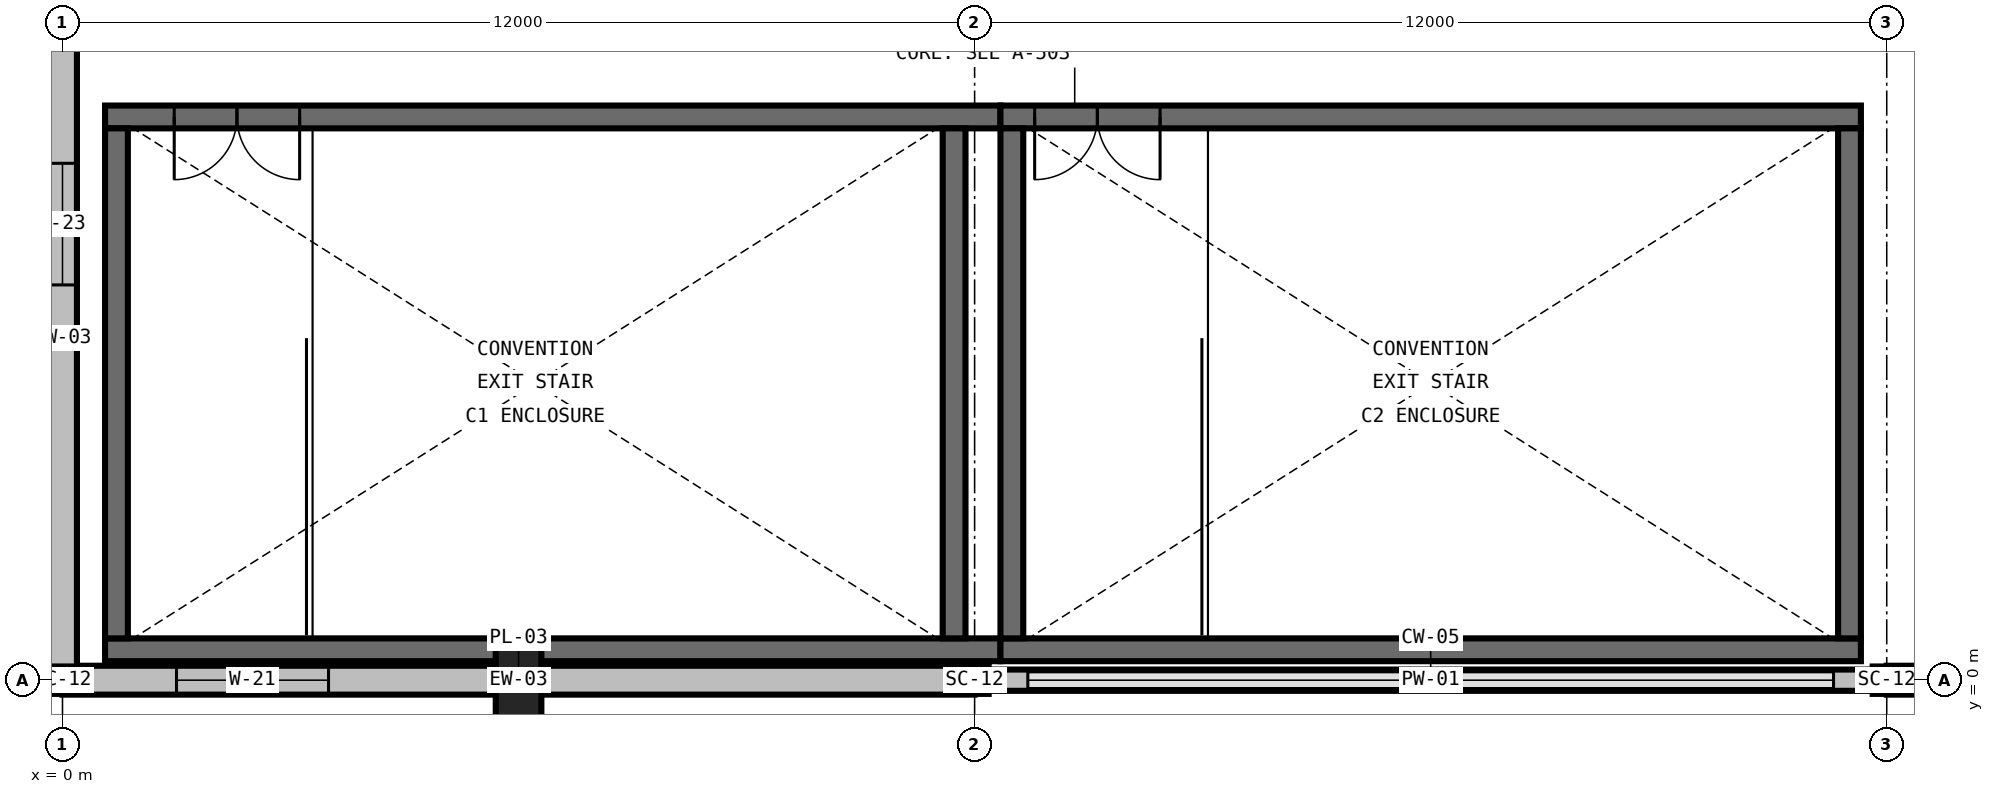
"""IFC4 building model, lengths in metres.
Left out: names, types, materials, properties, quantities, classifications, styles, units other than length and angle.
Written with IfcOpenShell. Run it as: python <this file> out.ifc"""

import sys

from ifc_helpers import new_model, si_unit, direction, frame, frame_2d, origin, origin_with_axes, origin_2d, place, context, subcontext, project, spatial, rectangle, i_section, extrude, element, fill, save


model = new_model("IFC4")
c1 = context("Model", 3, precision=1e-05, world=origin(), true_north=direction((0.0, 1.0)))
c2 = subcontext(c1, "Body", "Model", "MODEL_VIEW")
j1 = project(units=[si_unit("LENGTHUNIT", "METRE"), si_unit("PLANEANGLEUNIT", "RADIAN")], contexts=[c1])
p1 = place(None, origin())
s1 = spatial("IfcSite", under=j1, at=p1, CompositionType="ELEMENT")
p2 = place(p1, origin())
s2 = spatial("IfcBuilding", under=s1, at=p2, CompositionType="ELEMENT")
p3 = place(p2, frame((0.0, 0.0, 23.4)))
s3 = spatial("IfcBuildingStorey", under=s2, at=p3, CompositionType="ELEMENT", Elevation=23.4)
for number, where, z_axis, x_axis in (
    (1, (0.0, 0.0, 0.0), (0.0, 0.0, 1.0), (1.0, 0.0, 0.0)),
    (2, (12.0, 0.0, 0.0), (0.0, 0.0, 1.0), (1.0, 0.0, 0.0)),
    (3, (24.0, 0.0, 0.0), (0.0, 0.0, 1.0), (1.0, 0.0, 0.0)),
):
    element("IfcColumn", number, at=place(p3, frame(where, z_axis=z_axis, x_axis=x_axis)), inside=s3, PredefinedType="COLUMN", context=c2, shape_type="SweptSolid", body=[
        extrude(i_section(OverallWidth=0.37, OverallDepth=0.36, WebThickness=0.012, FlangeThickness=0.02, FilletRadius=0.031, at=origin_2d()), origin(), (0.0, 0.0, 1.0), 3.85),
    ])
p4 = place(p3, frame((6.0, 0.0, 0.0), z_axis=(0.0, 0.0, 1.0), x_axis=(1.0, 0.0, 0.0)))
e4 = element("IfcColumn", 4, at=p4, inside=s3, PredefinedType="PILASTER", context=c2, shape_type="SweptSolid", body=[
    extrude(rectangle(XDim=0.6, YDim=1.0, at=origin_2d()), origin(), (0.0, 0.0, 1.0), 3.85),
])
p5 = place(p3, frame((12.34, 0.4, 0.0), z_axis=(0.0, 0.0, 1.0), x_axis=(-1.0, 0.0, 0.0)))
e5 = element("IfcWall", 5, at=p5, inside=s3, PredefinedType="SHEAR", context=c2, shape_type="SweptSolid", body=[
    extrude(rectangle(XDim=11.78, YDim=0.3, at=frame_2d((5.89, 0.0))), origin(), (0.0, 0.0, 1.0), 3.85),
])
p6 = place(p3, frame((12.34, 7.41, 0.0), z_axis=(0.0, 0.0, 1.0), x_axis=(-1.0, 0.0, 0.0)))
e6 = element("IfcWall", 6, at=p6, inside=s3, PredefinedType="SHEAR", context=c2, shape_type="SweptSolid", body=[
    extrude(rectangle(XDim=11.78, YDim=0.3, at=frame_2d((5.89, 0.0))), origin(), (0.0, 0.0, 1.0), 3.85),
])
p7 = place(p6, frame((9.22, 0.0, 0.0)))
e7 = element("IfcOpeningElement", 7, at=p7, cuts=e6, PredefinedType="OPENING", context=c2, shape_type="SweptSolid", body=[
    extrude(rectangle(XDim=1.65, YDim=2.25, at=frame_2d((0.825, 1.125))), frame((0.0, 0.165, 0.0), z_axis=(0.0, -1.0, 0.0), x_axis=(1.0, 0.0, 0.0)), (0.0, 0.0, 1.0), 0.33),
])
for number, where, z_axis, x_axis in (
    (8, (0.71, 7.26, 0.0), (0.0, 0.0, 1.0), (0.0, -1.0, 0.0)),
    (9, (11.73, 0.55, 0.0), (0.0, 0.0, 1.0), (0.0, 1.0, 0.0)),
):
    element("IfcWall", number, at=place(p3, frame(where, z_axis=z_axis, x_axis=x_axis)), inside=s3, PredefinedType="SHEAR", context=c2, shape_type="SweptSolid", body=[
        extrude(rectangle(XDim=6.71, YDim=0.3, at=frame_2d((3.355, 0.0))), origin(), (0.0, 0.0, 1.0), 3.85),
    ])
p8 = place(p3, frame((23.66, 0.4, 0.0), z_axis=(0.0, 0.0, 1.0), x_axis=(-1.0, 0.0, 0.0)))
e10 = element("IfcWall", 10, at=p8, inside=s3, PredefinedType="SHEAR", context=c2, shape_type="SweptSolid", body=[
    extrude(rectangle(XDim=11.32, YDim=0.3, at=frame_2d((5.66, 0.0))), origin(), (0.0, 0.0, 1.0), 3.85),
])
p9 = place(p3, frame((23.66, 7.41, 0.0), z_axis=(0.0, 0.0, 1.0), x_axis=(-1.0, 0.0, 0.0)))
e11 = element("IfcWall", 11, at=p9, inside=s3, PredefinedType="SHEAR", context=c2, shape_type="SweptSolid", body=[
    extrude(rectangle(XDim=11.32, YDim=0.3, at=frame_2d((5.66, 0.0))), origin(), (0.0, 0.0, 1.0), 3.85),
])
p10 = place(p9, frame((9.22, 0.0, 0.0)))
e12 = element("IfcOpeningElement", 12, at=p10, cuts=e11, PredefinedType="OPENING", context=c2, shape_type="SweptSolid", body=[
    extrude(rectangle(XDim=1.65, YDim=2.25, at=frame_2d((0.825, 1.125))), frame((0.0, 0.165, 0.0), z_axis=(0.0, -1.0, 0.0), x_axis=(1.0, 0.0, 0.0)), (0.0, 0.0, 1.0), 0.33),
])
for number, where, z_axis, x_axis in (
    (13, (12.49, 7.26, 0.0), (0.0, 0.0, 1.0), (0.0, -1.0, 0.0)),
    (14, (23.51, 0.55, 0.0), (0.0, 0.0, 1.0), (0.0, 1.0, 0.0)),
):
    element("IfcWall", number, at=place(p3, frame(where, z_axis=z_axis, x_axis=x_axis)), inside=s3, PredefinedType="SHEAR", context=c2, shape_type="SweptSolid", body=[
        extrude(rectangle(XDim=6.71, YDim=0.3, at=frame_2d((3.355, 0.0))), origin(), (0.0, 0.0, 1.0), 3.85),
    ])
p11 = place(p3, origin_with_axes())
e15 = element("IfcWall", 15, at=p11, inside=s3, PredefinedType="STANDARD", context=c2, shape_type="SweptSolid", body=[
    extrude(rectangle(XDim=12.0, YDim=0.38, at=frame_2d((6.0, 0.0))), origin(), (0.0, 0.0, 1.0), 2.626),
])
p12 = place(p11, frame((1.5, 0.0, 0.85)))
e16 = element("IfcOpeningElement", 16, at=p12, cuts=e15, PredefinedType="OPENING", context=c2, shape_type="SweptSolid", body=[
    extrude(rectangle(XDim=2.0, YDim=1.56, at=frame_2d((1.0, 0.78))), frame((0.0, 0.205, 0.0), z_axis=(0.0, -1.0, 0.0), x_axis=(1.0, 0.0, 0.0)), (0.0, 0.0, 1.0), 0.41),
])
p13 = place(p3, frame((12.0, 0.0, 0.0), z_axis=(0.0, 0.0, 1.0), x_axis=(1.0, 0.0, 0.0)))
e17 = element("IfcWall", 17, at=p13, inside=s3, PredefinedType="PARAPET", context=c2, shape_type="SweptSolid", body=[
    extrude(rectangle(XDim=12.0, YDim=0.28, at=frame_2d((6.0, 0.0))), origin(), (0.0, 0.0, 1.0), 0.2),
])
p14 = place(p3, frame((24.0, 0.0, 0.0), z_axis=(0.0, 0.0, 1.0), x_axis=(1.0, 0.0, 0.0)))
e18 = element("IfcWall", 18, at=p14, inside=s3, PredefinedType="STANDARD", context=c2, shape_type="SweptSolid", body=[
    extrude(rectangle(XDim=6.0, YDim=0.38, at=frame_2d((3.0, 0.0))), origin(), (0.0, 0.0, 1.0), 2.626),
])
p15 = place(p3, frame((0.0, 9.0, 0.0), z_axis=(0.0, 0.0, 1.0), x_axis=(0.0, -1.0, 0.0)))
e19 = element("IfcWall", 19, at=p15, inside=s3, PredefinedType="STANDARD", context=c2, shape_type="SweptSolid", body=[
    extrude(rectangle(XDim=9.0, YDim=0.38, at=frame_2d((4.5, 0.0))), origin(), (0.0, 0.0, 1.0), 3.119),
])
p16 = place(p15, frame((2.2, 0.0, 1.0)))
e20 = element("IfcOpeningElement", 20, at=p16, cuts=e19, PredefinedType="OPENING", context=c2, shape_type="SweptSolid", body=[
    extrude(rectangle(XDim=1.6, YDim=1.36, at=frame_2d((0.8, 0.68))), frame((0.0, 0.205, 0.0), z_axis=(0.0, -1.0, 0.0), x_axis=(1.0, 0.0, 0.0)), (0.0, 0.0, 1.0), 0.41),
])
p17 = place(p3, frame((0.0, 0.14, 3.85), z_axis=(0.0, 0.0, 1.0), x_axis=(1.0, 0.0, 0.0)))
e21 = element("IfcWall", 21, at=p17, inside=s3, PredefinedType="PARAPET", context=c2, shape_type="SweptSolid", body=[
    extrude(rectangle(XDim=174.0, YDim=0.28, at=frame_2d((87.0, 0.0))), origin(), (0.0, 0.0, 1.0), 1.2),
])
p18 = place(p3, frame((0.14, 116.72, 3.85), z_axis=(0.0, 0.0, 1.0), x_axis=(0.0, -1.0, 0.0)))
e22 = element("IfcWall", 22, at=p18, inside=s3, PredefinedType="PARAPET", context=c2, shape_type="SweptSolid", body=[
    extrude(rectangle(XDim=116.44, YDim=0.28, at=frame_2d((58.22, 0.0))), origin(), (0.0, 0.0, 1.0), 1.2),
])
p19 = place(p7, origin())
e23 = element("IfcDoor", 23, at=p19, inside=s3, OperationType="DOUBLE_DOOR_SINGLE_SWING", PredefinedType="DOOR", context=c2, shape_type="SweptSolid", body=[
    extrude(rectangle(XDim=1.65, YDim=2.25, at=frame_2d((0.825, 1.125))), frame((0.0, 0.025, 0.0), z_axis=(0.0, -1.0, 0.0), x_axis=(1.0, 0.0, 0.0)), (0.0, 0.0, 1.0), 0.05),
])
fill(e7, e23)
p20 = place(p3, frame((0.0, 0.0, 3.53)))
p21 = place(p20, frame((1.86, 3.905, 0.0)))
p22 = place(p21, frame((0.0, 0.0, 0.27)))
e24 = element("IfcDoor", 24, at=p22, inside=s3, OperationType="SWING_FIXED_LEFT", PredefinedType="TRAPDOOR", context=c2, shape_type="SweptSolid", body=[
    extrude(rectangle(XDim=1.0, YDim=1.2, at=origin_2d()), origin(), (0.0, 0.0, 1.0), 0.05),
])
p23 = place(p10, origin())
e25 = element("IfcDoor", 25, at=p23, inside=s3, OperationType="DOUBLE_DOOR_SINGLE_SWING", PredefinedType="DOOR", context=c2, shape_type="SweptSolid", body=[
    extrude(rectangle(XDim=1.65, YDim=2.25, at=frame_2d((0.825, 1.125))), frame((0.0, 0.025, 0.0), z_axis=(0.0, -1.0, 0.0), x_axis=(1.0, 0.0, 0.0)), (0.0, 0.0, 1.0), 0.05),
])
fill(e12, e25)
p24 = place(p12, origin())
e26 = element("IfcWindow", 26, at=p24, inside=s3, PartitioningType="DOUBLE_PANEL_VERTICAL", PredefinedType="WINDOW", context=c2, shape_type="SweptSolid", body=[
    extrude(rectangle(XDim=2.0, YDim=1.56, at=frame_2d((1.0, 0.78))), frame((0.0, 0.03, 0.0), z_axis=(0.0, -1.0, 0.0), x_axis=(1.0, 0.0, 0.0)), (0.0, 0.0, 1.0), 0.06),
])
fill(e16, e26)
p25 = place(p16, origin())
e27 = element("IfcWindow", 27, at=p25, inside=s3, PartitioningType="SINGLE_PANEL", PredefinedType="WINDOW", context=c2, shape_type="SweptSolid", body=[
    extrude(rectangle(XDim=1.6, YDim=1.36, at=frame_2d((0.8, 0.68))), frame((0.0, 0.03, 0.0), z_axis=(0.0, -1.0, 0.0), x_axis=(1.0, 0.0, 0.0)), (0.0, 0.0, 1.0), 0.06),
])
fill(e20, e27)
save(model, sys.argv[1])
